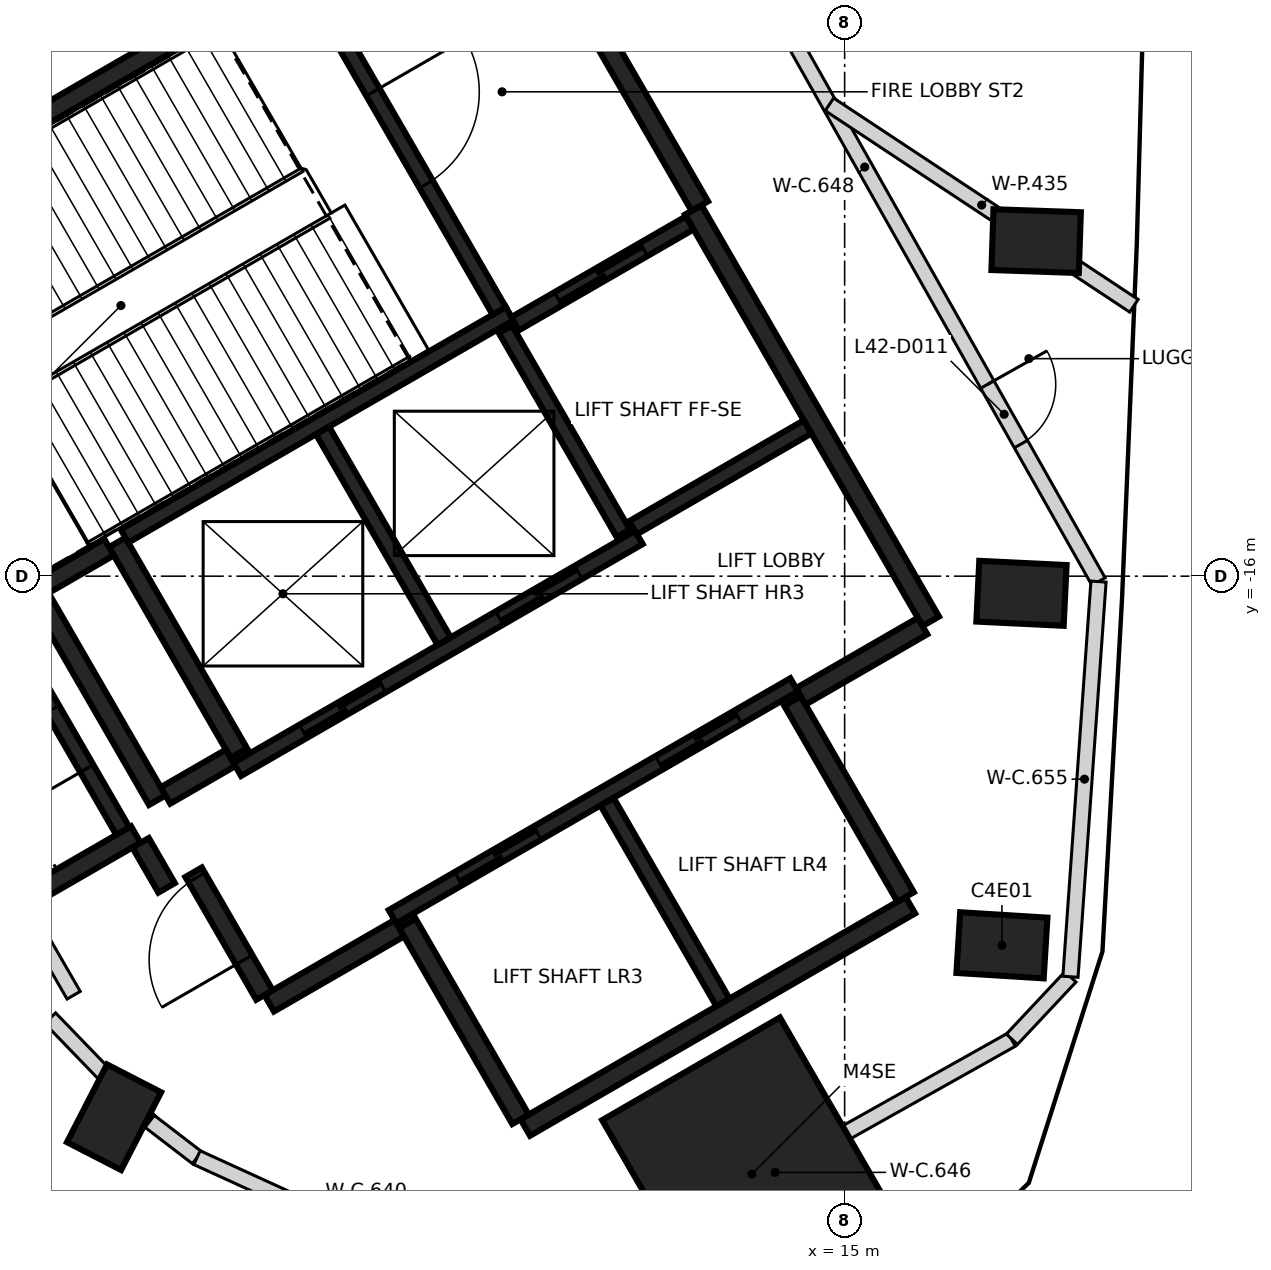
"""IFC4 building model, lengths in metres.
Left out: names, types, materials, properties, quantities, classifications, styles, units other than length and angle.
Written with IfcOpenShell. Run it as: python <this file> out.ifc"""

import sys

from ifc_helpers import new_model, si_unit, direction, frame, frame_2d, origin, origin_2d, place, context, subcontext, project, spatial, rectangle, extrude, element, fill, save


model = new_model("IFC4")
c1 = context("Model", 3, precision=1e-05, world=origin(), true_north=direction((0.0, 1.0)))
c2 = subcontext(c1, "Body", "Model", "MODEL_VIEW")
j1 = project(units=[si_unit("LENGTHUNIT", "METRE"), si_unit("PLANEANGLEUNIT", "RADIAN")], contexts=[c1])
p1 = place(None, origin())
s1 = spatial("IfcSite", under=j1, at=p1, CompositionType="ELEMENT")
p2 = place(p1, origin())
s2 = spatial("IfcBuilding", under=s1, at=p2, CompositionType="ELEMENT")
p3 = place(p2, frame((0.0, 0.0, 169.6)))
s3 = spatial("IfcBuildingStorey", under=s2, at=p3, CompositionType="ELEMENT", Elevation=169.6)
for number, where, z_axis, x_axis in (
    (1, (17.07, -20.856, -0.35), (0.0, 0.0, 1.0), (-0.998, 0.062, 0.0)),
    (2, (17.326, -16.226, -0.35), (0.0, 0.0, 1.0), (-0.999, 0.048, 0.0)),
    (3, (17.519, -11.592, -0.35), (0.0, 0.0, 1.0), (-0.999, 0.034, 0.0)),
    (4, (5.388, -23.118, -0.35), (0.0, 0.0, 1.0), (0.458, 0.889, 0.0)),
):
    element("IfcColumn", number, at=place(p3, frame(where, z_axis=z_axis, x_axis=x_axis)), inside=s3, PredefinedType="COLUMN", context=c2, shape_type="SweptSolid", body=[
        extrude(rectangle(XDim=1.15, YDim=0.8, at=origin_2d()), origin(), (0.0, 0.0, 1.0), 6.0),
    ])
p4 = place(p3, frame((13.78, -23.867, -0.35), z_axis=(0.0, 0.0, 1.0), x_axis=(-0.5, 0.866025403784, 0.0)))
e5 = element("IfcColumn", 5, at=p4, inside=s3, PredefinedType="COLUMN", context=c2, shape_type="SweptSolid", body=[
    extrude(rectangle(XDim=3.2, YDim=2.7, at=origin_2d()), origin(), (0.0, 0.0, 1.0), 6.0),
])
p5 = place(p3, frame((0.417, -12.273, 0.0), z_axis=(0.0, 0.0, 1.0), x_axis=(0.866021906294, 0.500006057782, 0.0)))
e6 = element("IfcWall", 6, at=p5, inside=s3, PredefinedType="SHEAR", context=c2, shape_type="SweptSolid", body=[
    extrude(rectangle(XDim=11.55, YDim=0.25, at=frame_2d((5.775, 0.0))), origin(), (0.0, 0.0, 1.0), 5.65),
])
p6 = place(p5, frame((10.025, 0.0, 0.0)))
e7 = element("IfcOpeningElement", 7, at=p6, cuts=e6, PredefinedType="OPENING", context=c2, shape_type="SweptSolid", body=[
    extrude(rectangle(XDim=1.2, YDim=2.1, at=frame_2d((0.6, 1.05))), frame((0.0, 0.135, 0.0), z_axis=(0.0, -1.0, 0.0), x_axis=(1.0, 0.0, 0.0)), (0.0, 0.0, 1.0), 0.27),
])
p7 = place(p5, frame((8.725, 0.0, 0.0)))
e8 = element("IfcOpeningElement", 8, at=p7, cuts=e6, PredefinedType="OPENING", context=c2, shape_type="SweptSolid", body=[
    extrude(rectangle(XDim=1.2, YDim=2.1, at=frame_2d((0.6, 1.05))), frame((0.0, 0.135, 0.0), z_axis=(0.0, -1.0, 0.0), x_axis=(1.0, 0.0, 0.0)), (0.0, 0.0, 1.0), 0.27),
])
p8 = place(p3, frame((13.008, -11.181, 0.0), z_axis=(0.0, 0.0, 1.0), x_axis=(0.500004234368, -0.866022959057, 0.0)))
e9 = element("IfcWall", 9, at=p8, inside=s3, PredefinedType="SHEAR", context=c2, shape_type="SweptSolid", body=[
    extrude(rectangle(XDim=6.25, YDim=0.25, at=frame_2d((3.125, 0.0))), origin(), (0.0, 0.0, 1.0), 5.65),
])
p9 = place(p3, frame((15.865, -20.328, 0.0), z_axis=(0.0, 0.0, 1.0), x_axis=(-0.86602852612, -0.499994591916, 0.0)))
e10 = element("IfcWall", 10, at=p9, inside=s3, PredefinedType="SHEAR", context=c2, shape_type="SweptSolid", body=[
    extrude(rectangle(XDim=5.85, YDim=0.25, at=frame_2d((2.925, 0.0))), origin(), (0.0, 0.0, 1.0), 5.65),
])
p10 = place(p3, frame((10.483, -6.606, 0.0), z_axis=(0.0, 0.0, 1.0), x_axis=(0.49999885962, -0.866026062182, 0.0)))
e11 = element("IfcWall", 11, at=p10, inside=s3, PredefinedType="SHEAR", context=c2, shape_type="SweptSolid", body=[
    extrude(rectangle(XDim=5.225, YDim=0.25, at=frame_2d((2.612, 0.0))), origin(), (0.0, 0.0, 1.0), 5.65),
])
p11 = place(p3, frame((7.031, -18.327, 0.0), z_axis=(0.0, 0.0, 1.0), x_axis=(-0.499971222258, 0.866042017984, 0.0)))
e12 = element("IfcWall", 12, at=p11, inside=s3, PredefinedType="SHEAR", context=c2, shape_type="SweptSolid", body=[
    extrude(rectangle(XDim=3.2, YDim=0.25, at=frame_2d((1.6, 0.0))), origin(), (0.0, 0.0, 1.0), 5.65),
])
for number, where, z_axis, x_axis in (
    (13, (14.315, -17.644, 0.0), (0.0, 0.0, 1.0), (0.5, -0.866, 0.0)),
    (14, (10.736, -23.145, 0.0), (0.0, 0.0, 1.0), (-0.5, 0.866, 0.0)),
):
    element("IfcWall", number, at=place(p3, frame(where, z_axis=z_axis, x_axis=x_axis)), inside=s3, PredefinedType="SHEAR", context=c2, shape_type="SweptSolid", body=[
        extrude(rectangle(XDim=2.974, YDim=0.25, at=frame_2d((1.487, 0.0))), origin(), (0.0, 0.0, 1.0), 5.65),
    ])
p12 = place(p3, frame((5.675, -19.399, 0.0), z_axis=(0.0, 0.0, 1.0), x_axis=(-0.866026637627, -0.499997862916, 0.0)))
e15 = element("IfcWall", 15, at=p12, inside=s3, PredefinedType="SHEAR", context=c2, shape_type="SweptSolid", body=[
    extrude(rectangle(XDim=2.865, YDim=0.25, at=frame_2d((1.432, 0.0))), origin(), (0.0, 0.0, 1.0), 5.65),
])
p13 = place(p3, frame((4.414, -16.276, 0.0), z_axis=(0.0, 0.0, 1.0), x_axis=(0.500003324108, -0.866023484601, 0.0)))
e16 = element("IfcWall", 16, at=p13, inside=s3, PredefinedType="SHEAR", context=c2, shape_type="SweptSolid", body=[
    extrude(rectangle(XDim=3.085, YDim=0.25, at=frame_2d((1.542, 0.0))), origin(), (0.0, 0.0, 1.0), 5.65),
])
p14 = place(p3, frame((5.322, -15.619, 0.0), z_axis=(0.0, 0.0, 1.0), x_axis=(-0.866026229868, -0.499998569178, 0.0)))
e17 = element("IfcWall", 17, at=p14, inside=s3, PredefinedType="SHEAR", context=c2, shape_type="SweptSolid", body=[
    extrude(rectangle(XDim=2.449, YDim=0.25, at=frame_2d((1.225, 0.0))), origin(), (0.0, 0.0, 1.0), 5.65),
])
p15 = place(p3, frame((9.14, -20.631, 0.0), z_axis=(0.0, 0.0, 1.0), x_axis=(-0.866043531843, -0.499968599967, 0.0)))
e18 = element("IfcWall", 18, at=p15, inside=s3, PredefinedType="SHEAR", context=c2, shape_type="SweptSolid", body=[
    extrude(rectangle(XDim=1.975, YDim=0.25, at=frame_2d((0.987, 0.0))), origin(), (0.0, 0.0, 1.0), 5.65),
])
p16 = place(p3, frame((16.025, -16.656, 0.0), z_axis=(0.0, 0.0, 1.0), x_axis=(-0.866016279763, -0.500015802937, 0.0)))
e19 = element("IfcWall", 19, at=p16, inside=s3, PredefinedType="SHEAR", context=c2, shape_type="SweptSolid", body=[
    extrude(rectangle(XDim=1.849, YDim=0.25, at=frame_2d((0.925, 0.0))), origin(), (0.0, 0.0, 1.0), 5.65),
])
p17 = place(p3, frame((7.367, -21.51, 0.0), z_axis=(0.0, 0.0, 1.0), x_axis=(-0.499983108224, 0.866035156036, 0.0)))
e20 = element("IfcWall", 20, at=p17, inside=s3, PredefinedType="SHEAR", context=c2, shape_type="SweptSolid", body=[
    extrude(rectangle(XDim=1.865, YDim=0.25, at=frame_2d((0.932, 0.0))), origin(), (0.0, 0.0, 1.0), 5.65),
])
p18 = place(p17, frame((0.535, 0.0, 0.0)))
e21 = element("IfcOpeningElement", 21, at=p18, cuts=e20, PredefinedType="OPENING", context=c2, shape_type="SweptSolid", body=[
    extrude(rectangle(XDim=1.25, YDim=2.1, at=frame_2d((0.625, 1.05))), frame((0.0, 0.135, 0.0), z_axis=(0.0, -1.0, 0.0), x_axis=(1.0, 0.0, 0.0)), (0.0, 0.0, 1.0), 0.27),
])
p19 = place(p3, frame((6.065, -18.885, 0.0), z_axis=(0.0, 0.0, 1.0), x_axis=(0.866017078145, 0.500014420154, 0.0)))
e22 = element("IfcWall", 22, at=p19, inside=s3, PredefinedType="SHEAR", context=c2, shape_type="SweptSolid", body=[
    extrude(rectangle(XDim=0.989, YDim=0.25, at=frame_2d((0.495, 0.0))), origin(), (0.0, 0.0, 1.0), 5.65),
])
p20 = place(p3, frame((6.08, -20.1, 0.0), z_axis=(0.0, 0.0, 1.0), x_axis=(-0.500051773299, 0.865995510393, 0.0)))
e23 = element("IfcWall", 23, at=p20, inside=s3, PredefinedType="SHEAR", context=c2, shape_type="SweptSolid", body=[
    extrude(rectangle(XDim=0.685, YDim=0.25, at=frame_2d((0.342, 0.0))), origin(), (0.0, 0.0, 1.0), 5.65),
])
p21 = place(p3, frame((9.052, -20.48, 0.0), z_axis=(0.0, 0.0, 1.0), x_axis=(0.866030299012, 0.499991521122, 0.0)))
e24 = element("IfcWall", 24, at=p21, inside=s3, PredefinedType="SHEAR", context=c2, shape_type="SweptSolid", body=[
    extrude(rectangle(XDim=6.1, YDim=0.2, at=frame_2d((3.05, 0.0))), origin(), (0.0, 0.0, 1.0), 5.65),
])
p22 = place(p21, frame((1.0, 0.0, 0.0)))
e25 = element("IfcOpeningElement", 25, at=p22, cuts=e24, PredefinedType="OPENING", context=c2, shape_type="SweptSolid", body=[
    extrude(rectangle(XDim=1.2, YDim=2.1, at=frame_2d((0.6, 1.05))), frame((0.0, 0.11, 0.0), z_axis=(0.0, -1.0, 0.0), x_axis=(1.0, 0.0, 0.0)), (0.0, 0.0, 1.0), 0.22),
])
p23 = place(p21, frame((4.05, 0.0, 0.0)))
e26 = element("IfcOpeningElement", 26, at=p23, cuts=e24, PredefinedType="OPENING", context=c2, shape_type="SweptSolid", body=[
    extrude(rectangle(XDim=1.2, YDim=2.1, at=frame_2d((0.6, 1.05))), frame((0.0, 0.11, 0.0), z_axis=(0.0, -1.0, 0.0), x_axis=(1.0, 0.0, 0.0)), (0.0, 0.0, 1.0), 0.22),
])
p24 = place(p3, frame((5.526, -15.472, 0.0), z_axis=(0.0, 0.0, 1.0), x_axis=(0.866041752167, 0.499971682701, 0.0)))
e27 = element("IfcWall", 27, at=p24, inside=s3, PredefinedType="SHEAR", context=c2, shape_type="SweptSolid", body=[
    extrude(rectangle(XDim=5.851, YDim=0.2, at=frame_2d((2.925, 0.0))), origin(), (0.0, 0.0, 1.0), 5.65),
])
p25 = place(p3, frame((12.293, -15.491, 0.0), z_axis=(0.0, 0.0, 1.0), x_axis=(-0.866030299012, -0.499991521122, 0.0)))
e28 = element("IfcWall", 28, at=p25, inside=s3, PredefinedType="SHEAR", context=c2, shape_type="SweptSolid", body=[
    extrude(rectangle(XDim=6.1, YDim=0.2, at=frame_2d((3.05, 0.0))), origin(), (0.0, 0.0, 1.0), 5.65),
])
p26 = place(p25, frame((3.9, 0.0, 0.0)))
e29 = element("IfcOpeningElement", 29, at=p26, cuts=e28, PredefinedType="OPENING", context=c2, shape_type="SweptSolid", body=[
    extrude(rectangle(XDim=1.2, YDim=2.1, at=frame_2d((0.6, 1.05))), frame((0.0, 0.11, 0.0), z_axis=(0.0, -1.0, 0.0), x_axis=(1.0, 0.0, 0.0)), (0.0, 0.0, 1.0), 0.22),
])
p27 = place(p25, frame((0.918, 0.0, 0.0)))
e30 = element("IfcOpeningElement", 30, at=p27, cuts=e28, PredefinedType="OPENING", context=c2, shape_type="SweptSolid", body=[
    extrude(rectangle(XDim=1.2, YDim=2.1, at=frame_2d((0.6, 1.05))), frame((0.0, 0.11, 0.0), z_axis=(0.0, -1.0, 0.0), x_axis=(1.0, 0.0, 0.0)), (0.0, 0.0, 1.0), 0.22),
])
p28 = place(p3, frame((7.906, -8.094, 0.0), z_axis=(0.0, 0.0, 1.0), x_axis=(0.500027839223, -0.866009330205, 0.0)))
e31 = element("IfcWall", 31, at=p28, inside=s3, PredefinedType="SHEAR", context=c2, shape_type="SweptSolid", body=[
    extrude(rectangle(XDim=5.098, YDim=0.2, at=frame_2d((2.549, 0.0))), origin(), (0.0, 0.0, 1.0), 5.65),
])
p29 = place(p28, frame((1.774, 0.0, 0.0)))
e32 = element("IfcOpeningElement", 32, at=p29, cuts=e31, PredefinedType="OPENING", context=c2, shape_type="SweptSolid", body=[
    extrude(rectangle(XDim=1.4, YDim=2.1, at=frame_2d((0.7, 1.05))), frame((0.0, 0.11, 0.0), z_axis=(0.0, -1.0, 0.0), x_axis=(1.0, 0.0, 0.0)), (0.0, 0.0, 1.0), 0.22),
])
p30 = place(p3, frame((8.132, -14.084, 0.0), z_axis=(0.0, 0.0, 1.0), x_axis=(0.499997778408, -0.866026686418, 0.0)))
e33 = element("IfcWall", 33, at=p30, inside=s3, PredefinedType="SHEAR", context=c2, shape_type="SweptSolid", body=[
    extrude(rectangle(XDim=3.198, YDim=0.2, at=frame_2d((1.599, 0.0))), origin(), (0.0, 0.0, 1.0), 5.65),
])
p31 = place(p3, frame((11.875, -18.967, 0.0), z_axis=(0.0, 0.0, 1.0), x_axis=(0.49998131003, -0.866036194175, 0.0)))
e34 = element("IfcWall", 34, at=p31, inside=s3, PredefinedType="SHEAR", context=c2, shape_type="SweptSolid", body=[
    extrude(rectangle(XDim=3.048, YDim=0.2, at=frame_2d((1.524, 0.0))), origin(), (0.0, 0.0, 1.0), 5.65),
])
p32 = place(p3, frame((5.503, -19.352, 0.0), z_axis=(0.0, 0.0, 1.0), x_axis=(-0.499986818241, 0.866033014143, 0.0)))
e35 = element("IfcWall", 35, at=p32, inside=s3, PredefinedType="SHEAR", context=c2, shape_type="SweptSolid", body=[
    extrude(rectangle(XDim=2.798, YDim=0.2, at=frame_2d((1.399, 0.0))), origin(), (0.0, 0.0, 1.0), 5.65),
])
p33 = place(p32, frame((0.949, 0.0, 0.0)))
e36 = element("IfcOpeningElement", 36, at=p33, cuts=e35, PredefinedType="OPENING", context=c2, shape_type="SweptSolid", body=[
    extrude(rectangle(XDim=0.9, YDim=2.1, at=frame_2d((0.45, 1.05))), frame((0.0, 0.11, 0.0), z_axis=(0.0, -1.0, 0.0), x_axis=(1.0, 0.0, 0.0)), (0.0, 0.0, 1.0), 0.22),
])
p34 = place(p3, frame((12.088, -15.437, 0.0), z_axis=(0.0, 0.0, 1.0), x_axis=(-0.500026960575, 0.86600983753, 0.0)))
e37 = element("IfcWall", 37, at=p34, inside=s3, PredefinedType="SHEAR", context=c2, shape_type="SweptSolid", body=[
    extrude(rectangle(XDim=3.1, YDim=0.2, at=frame_2d((1.55, 0.0))), origin(), (0.0, 0.0, 1.0), 5.65),
])
p35 = place(p3, frame((10.666, -12.678, 0.0), z_axis=(0.0, 0.0, 1.0), x_axis=(0.866018407898, 0.500012117035, 0.0)))
e38 = element("IfcWall", 38, at=p35, inside=s3, PredefinedType="SHEAR", context=c2, shape_type="SweptSolid", body=[
    extrude(rectangle(XDim=2.651, YDim=0.2, at=frame_2d((1.325, 0.0))), origin(), (0.0, 0.0, 1.0), 5.65),
])
p36 = place(p35, frame((0.652, 0.0, 0.0)))
e39 = element("IfcOpeningElement", 39, at=p36, cuts=e38, PredefinedType="OPENING", context=c2, shape_type="SweptSolid", body=[
    extrude(rectangle(XDim=1.3, YDim=2.1, at=frame_2d((0.65, 1.05))), frame((0.0, 0.11, 0.0), z_axis=(0.0, -1.0, 0.0), x_axis=(1.0, 0.0, 0.0)), (0.0, 0.0, 1.0), 0.22),
])
p37 = place(p3, frame((14.512, -14.037, 0.0), z_axis=(0.0, 0.0, 1.0), x_axis=(-0.866018407898, -0.500012117035, 0.0)))
e40 = element("IfcWall", 40, at=p37, inside=s3, PredefinedType="SHEAR", context=c2, shape_type="SweptSolid", body=[
    extrude(rectangle(XDim=2.651, YDim=0.2, at=frame_2d((1.325, 0.0))), origin(), (0.0, 0.0, 1.0), 5.65),
])
p38 = place(p3, frame((4.239, -20.442, 0.0), z_axis=(0.0, 0.0, 1.0), x_axis=(0.499790804427, -0.866146149221, 0.0)))
e41 = element("IfcWall", 41, at=p38, inside=s3, PredefinedType="PARTITIONING", context=c2, shape_type="SweptSolid", body=[
    extrude(rectangle(XDim=1.237, YDim=0.2, at=frame_2d((0.618, 0.0))), origin(), (0.0, 0.0, 1.0), 5.65),
])
p39 = place(p3, frame((4.548, -21.815, 0.0), z_axis=(0.0, 0.0, 1.0), x_axis=(0.694726619633, -0.71927388662, 0.0)))
e42 = element("IfcWall", 42, at=p39, inside=s3, PredefinedType="PARTITIONING", context=c2, shape_type="SweptSolid", body=[
    extrude(rectangle(XDim=1.88, YDim=0.2, at=frame_2d((0.94, 0.0))), origin(), (0.0, 0.0, 1.0), 5.65),
])
p40 = place(p3, frame((5.857, -23.172, 0.0), z_axis=(0.0, 0.0, 1.0), x_axis=(0.793536289636, -0.608522930571, 0.0)))
e43 = element("IfcWall", 43, at=p40, inside=s3, PredefinedType="PARTITIONING", context=c2, shape_type="SweptSolid", body=[
    extrude(rectangle(XDim=0.785, YDim=0.2, at=frame_2d((0.393, 0.0))), origin(), (0.0, 0.0, 1.0), 4.75),
])
p41 = place(p3, frame((6.48, -23.65, 0.0), z_axis=(0.0, 0.0, 1.0), x_axis=(0.909595087695, -0.415495820005, 0.0)))
e44 = element("IfcWall", 44, at=p41, inside=s3, PredefinedType="PARTITIONING", context=c2, shape_type="SweptSolid", body=[
    extrude(rectangle(XDim=3.41, YDim=0.2, at=frame_2d((1.705, 0.0))), origin(), (0.0, 0.0, 1.0), 4.75),
])
p42 = place(p3, frame((10.974, -25.59, 0.0), z_axis=(0.0, 0.0, 1.0), x_axis=(0.872017342382, 0.489474978508, 0.0)))
e45 = element("IfcWall", 45, at=p42, inside=s3, PredefinedType="PARTITIONING", context=c2, shape_type="SweptSolid", body=[
    extrude(rectangle(XDim=7.137, YDim=0.2, at=frame_2d((3.568, 0.0))), origin(), (0.0, 0.0, 1.0), 4.75),
])
p43 = place(p3, frame((12.187, -5.164, 0.0), z_axis=(0.0, 0.0, 1.0), x_axis=(0.491323462206, -0.870977184251, 0.0)))
e46 = element("IfcWall", 46, at=p43, inside=s3, PredefinedType="PARTITIONING", context=c2, shape_type="SweptSolid", body=[
    extrude(rectangle(XDim=12.523, YDim=0.2, at=frame_2d((6.261, 0.0))), origin(), (0.0, 0.0, 1.0), 4.75),
])
p44 = place(p43, frame((9.546, 0.0, 0.0)))
e47 = element("IfcOpeningElement", 47, at=p44, cuts=e46, PredefinedType="OPENING", context=c2, shape_type="SweptSolid", body=[
    extrude(rectangle(XDim=0.9, YDim=2.1, at=frame_2d((0.45, 1.05))), frame((0.0, 0.11, 0.0), z_axis=(0.0, -1.0, 0.0), x_axis=(1.0, 0.0, 0.0)), (0.0, 0.0, 1.0), 0.22),
])
p45 = place(p43, frame((2.168, 0.0, 0.0)))
e48 = element("IfcOpeningElement", 48, at=p45, cuts=e46, PredefinedType="OPENING", context=c2, shape_type="SweptSolid", body=[
    extrude(rectangle(XDim=1.0, YDim=2.1, at=frame_2d((0.5, 1.05))), frame((0.0, 0.11, 0.0), z_axis=(0.0, -1.0, 0.0), x_axis=(1.0, 0.0, 0.0)), (0.0, 0.0, 1.0), 0.22),
])
p46 = place(p3, frame((17.201, -22.092, 0.0), z_axis=(0.0, 0.0, 1.0), x_axis=(0.684078196325, 0.729408679214, 0.0)))
e49 = element("IfcWall", 49, at=p46, inside=s3, PredefinedType="PARTITIONING", context=c2, shape_type="SweptSolid", body=[
    extrude(rectangle(XDim=1.126, YDim=0.2, at=frame_2d((0.563, 0.0))), origin(), (0.0, 0.0, 1.0), 5.65),
])
p47 = place(p3, frame((17.971, -21.27, 0.0), z_axis=(0.0, 0.0, 1.0), x_axis=(0.070824281614, 0.997488807523, 0.0)))
e50 = element("IfcWall", 50, at=p47, inside=s3, PredefinedType="PARTITIONING", context=c2, shape_type="SweptSolid", body=[
    extrude(rectangle(XDim=5.212, YDim=0.2, at=frame_2d((2.606, 0.0))), origin(), (0.0, 0.0, 1.0), 5.65),
])
p48 = place(p3, frame((13.845, -23.98, 0.0), z_axis=(0.0, 0.0, 1.0), x_axis=(0.499958721521, -0.866049234614, 0.0)))
e51 = element("IfcWall", 51, at=p48, inside=s3, PredefinedType="PARTITIONING", context=c2, shape_type="SweptSolid", body=[
    extrude(rectangle(XDim=2.564, YDim=0.2, at=frame_2d((1.282, 0.0))), origin(), (0.0, 0.0, 1.0), 5.65),
])
p49 = place(p3, frame((14.8, -9.793, 0.0), z_axis=(0.0, 0.0, 1.0), x_axis=(0.834078048978, -0.551646452189, 0.0)))
e52 = element("IfcWall", 52, at=p49, inside=s3, PredefinedType="PARTITIONING", context=c2, shape_type="SweptSolid", body=[
    extrude(rectangle(XDim=4.803, YDim=0.2, at=frame_2d((2.401, 0.0))), origin(), (0.0, 0.0, 1.0), 5.65),
])
p50 = place(p36, origin())
e53 = element("IfcDoor", 53, at=p50, inside=s3, OperationType="SLIDING_TO_RIGHT", PredefinedType="DOOR", context=c2, shape_type="SweptSolid", body=[
    extrude(rectangle(XDim=1.3, YDim=2.1, at=frame_2d((0.65, 1.05))), frame((0.0, 0.025, 0.0), z_axis=(0.0, -1.0, 0.0), x_axis=(1.0, 0.0, 0.0)), (0.0, 0.0, 1.0), 0.05),
])
fill(e39, e53)
p51 = place(p26, origin())
e54 = element("IfcDoor", 54, at=p51, inside=s3, OperationType="DOUBLE_DOOR_SLIDING", PredefinedType="DOOR", context=c2, shape_type="SweptSolid", body=[
    extrude(rectangle(XDim=1.2, YDim=2.1, at=frame_2d((0.6, 1.05))), frame((0.0, 0.025, 0.0), z_axis=(0.0, -1.0, 0.0), x_axis=(1.0, 0.0, 0.0)), (0.0, 0.0, 1.0), 0.05),
])
fill(e29, e54)
p52 = place(p27, origin())
e55 = element("IfcDoor", 55, at=p52, inside=s3, OperationType="DOUBLE_DOOR_SLIDING", PredefinedType="DOOR", context=c2, shape_type="SweptSolid", body=[
    extrude(rectangle(XDim=1.2, YDim=2.1, at=frame_2d((0.6, 1.05))), frame((0.0, 0.025, 0.0), z_axis=(0.0, -1.0, 0.0), x_axis=(1.0, 0.0, 0.0)), (0.0, 0.0, 1.0), 0.05),
])
fill(e30, e55)
p53 = place(p22, origin())
e56 = element("IfcDoor", 56, at=p53, inside=s3, OperationType="DOUBLE_DOOR_SLIDING", PredefinedType="DOOR", context=c2, shape_type="SweptSolid", body=[
    extrude(rectangle(XDim=1.2, YDim=2.1, at=frame_2d((0.6, 1.05))), frame((0.0, 0.025, 0.0), z_axis=(0.0, -1.0, 0.0), x_axis=(1.0, 0.0, 0.0)), (0.0, 0.0, 1.0), 0.05),
])
fill(e25, e56)
p54 = place(p23, origin())
e57 = element("IfcDoor", 57, at=p54, inside=s3, OperationType="DOUBLE_DOOR_SLIDING", PredefinedType="DOOR", context=c2, shape_type="SweptSolid", body=[
    extrude(rectangle(XDim=1.2, YDim=2.1, at=frame_2d((0.6, 1.05))), frame((0.0, 0.025, 0.0), z_axis=(0.0, -1.0, 0.0), x_axis=(1.0, 0.0, 0.0)), (0.0, 0.0, 1.0), 0.05),
])
fill(e26, e57)
p55 = place(p18, origin())
e58 = element("IfcDoor", 58, at=p55, inside=s3, OperationType="SINGLE_SWING_LEFT", PredefinedType="DOOR", context=c2, shape_type="SweptSolid", body=[
    extrude(rectangle(XDim=1.25, YDim=2.1, at=frame_2d((0.625, 1.05))), frame((0.0, 0.025, 0.0), z_axis=(0.0, -1.0, 0.0), x_axis=(1.0, 0.0, 0.0)), (0.0, 0.0, 1.0), 0.05),
])
fill(e21, e58)
p56 = place(p29, origin())
e59 = element("IfcDoor", 59, at=p56, inside=s3, OperationType="SINGLE_SWING_RIGHT", PredefinedType="DOOR", context=c2, shape_type="SweptSolid", body=[
    extrude(rectangle(XDim=1.4, YDim=2.1, at=frame_2d((0.7, 1.05))), frame((0.0, 0.025, 0.0), z_axis=(0.0, -1.0, 0.0), x_axis=(1.0, 0.0, 0.0)), (0.0, 0.0, 1.0), 0.05),
])
fill(e32, e59)
p57 = place(p33, origin())
e60 = element("IfcDoor", 60, at=p57, inside=s3, OperationType="SINGLE_SWING_LEFT", PredefinedType="DOOR", context=c2, shape_type="SweptSolid", body=[
    extrude(rectangle(XDim=0.9, YDim=2.1, at=frame_2d((0.45, 1.05))), frame((0.0, 0.025, 0.0), z_axis=(0.0, -1.0, 0.0), x_axis=(1.0, 0.0, 0.0)), (0.0, 0.0, 1.0), 0.05),
])
fill(e36, e60)
p58 = place(p44, frame((0.9, 0.0, 0.0), z_axis=(0.0, 0.0, 1.0), x_axis=(-1.0, 0.0, 0.0)))
e61 = element("IfcDoor", 61, at=p58, inside=s3, OperationType="SINGLE_SWING_LEFT", PredefinedType="DOOR", context=c2, shape_type="SweptSolid", body=[
    extrude(rectangle(XDim=0.9, YDim=2.1, at=frame_2d((0.45, 1.05))), frame((0.0, 0.025, 0.0), z_axis=(0.0, -1.0, 0.0), x_axis=(1.0, 0.0, 0.0)), (0.0, 0.0, 1.0), 0.05),
])
fill(e47, e61)
save(model, sys.argv[1])
